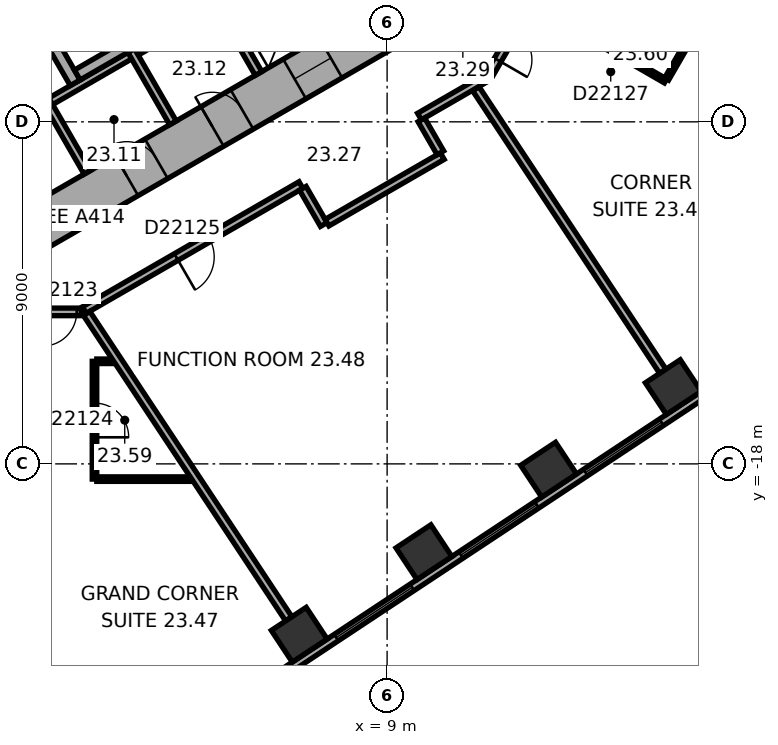
"""IFC4 building model, lengths in metres.
Left out: names, types, materials, properties, quantities, classifications, styles, units other than length and angle.
Written with IfcOpenShell. Run it as: python <this file> out.ifc"""

import sys

from ifc_helpers import new_model, si_unit, direction, frame, frame_2d, origin, origin_2d, place, context, subcontext, project, spatial, rectangle, extrude, element, fill, save


model = new_model("IFC4")
c1 = context("Model", 3, precision=1e-05, world=origin(), true_north=direction((0.0, 1.0)))
c2 = subcontext(c1, "Body", "Model", "MODEL_VIEW")
j1 = project(units=[si_unit("LENGTHUNIT", "METRE"), si_unit("PLANEANGLEUNIT", "RADIAN")], contexts=[c1])
p1 = place(None, origin())
s1 = spatial("IfcSite", under=j1, at=p1, CompositionType="ELEMENT")
p2 = place(p1, origin())
s2 = spatial("IfcBuilding", under=s1, at=p2, CompositionType="ELEMENT")
p3 = place(p2, frame((0.0, 0.0, 100.1)))
s3 = spatial("IfcBuildingStorey", under=s2, at=p3, CompositionType="ELEMENT", Elevation=100.1)
for number, where, z_axis, x_axis in (
    (1, (6.688, -22.496, 0.0), (0.0, 0.0, 1.0), (0.834, 0.552, 0.0)),
    (2, (9.969, -20.324, 0.0), (0.0, 0.0, 1.0), (0.834, 0.552, 0.0)),
    (3, (13.25, -18.152, 0.0), (0.0, 0.0, 1.0), (0.834, 0.552, 0.0)),
    (4, (16.531, -15.981, 0.0), (0.0, 0.0, 1.0), (0.834, 0.552, 0.0)),
):
    element("IfcColumn", number, at=place(p3, frame(where, z_axis=z_axis, x_axis=x_axis)), inside=s3, PredefinedType="COLUMN", context=c2, shape_type="SweptSolid", body=[
        extrude(rectangle(XDim=1.1, YDim=1.0, at=origin_2d()), origin(), (0.0, 0.0, 1.0), 3.3),
    ])
p4 = place(p3, frame((-10.4, -5.658, 0.0), z_axis=(0.0, 0.0, 1.0), x_axis=(0.866021384402, -0.500006961711, 0.0)))
e5 = element("IfcWall", 5, at=p4, inside=s3, PredefinedType="SHEAR", context=c2, shape_type="SweptSolid", body=[
    extrude(rectangle(XDim=12.355, YDim=1.2, at=frame_2d((6.178, 0.0))), origin(), (0.0, 0.0, 1.0), 3.3),
])
p5 = place(p4, frame((6.378, 0.0, 0.0)))
e6 = element("IfcOpeningElement", 6, at=p5, cuts=e5, PredefinedType="OPENING", context=c2, shape_type="SweptSolid", body=[
    extrude(rectangle(XDim=1.5, YDim=2.1, at=frame_2d((0.75, 1.05))), frame((0.0, 0.61, 0.0), z_axis=(0.0, -1.0, 0.0), x_axis=(1.0, 0.0, 0.0)), (0.0, 0.0, 1.0), 1.22),
])
p6 = place(p4, frame((3.228, 0.0, 0.0)))
e7 = element("IfcOpeningElement", 7, at=p6, cuts=e5, PredefinedType="OPENING", context=c2, shape_type="SweptSolid", body=[
    extrude(rectangle(XDim=0.9, YDim=2.1, at=frame_2d((0.45, 1.05))), frame((0.0, 0.61, 0.0), z_axis=(0.0, -1.0, 0.0), x_axis=(1.0, 0.0, 0.0)), (0.0, 0.0, 1.0), 1.22),
])
p7 = place(p3, frame((-0.3, -11.836, 0.0), z_axis=(0.0, 0.0, 1.0), x_axis=(0.866021384402, 0.500006961711, 0.0)))
e8 = element("IfcWall", 8, at=p7, inside=s3, PredefinedType="SHEAR", context=c2, shape_type="SweptSolid", body=[
    extrude(rectangle(XDim=12.355, YDim=1.2, at=frame_2d((6.178, 0.0))), origin(), (0.0, 0.0, 1.0), 3.3),
])
p8 = place(p7, frame((2.828, 0.0, 0.0)))
e9 = element("IfcOpeningElement", 9, at=p8, cuts=e8, PredefinedType="OPENING", context=c2, shape_type="SweptSolid", body=[
    extrude(rectangle(XDim=0.9, YDim=2.1, at=frame_2d((0.45, 1.05))), frame((0.0, 0.61, 0.0), z_axis=(0.0, -1.0, 0.0), x_axis=(1.0, 0.0, 0.0)), (0.0, 0.0, 1.0), 1.22),
])
p9 = place(p7, frame((5.428, 0.0, 0.0)))
e10 = element("IfcOpeningElement", 10, at=p9, cuts=e8, PredefinedType="OPENING", context=c2, shape_type="SweptSolid", body=[
    extrude(rectangle(XDim=0.9, YDim=2.1, at=frame_2d((0.45, 1.05))), frame((0.0, 0.61, 0.0), z_axis=(0.0, -1.0, 0.0), x_axis=(1.0, 0.0, 0.0)), (0.0, 0.0, 1.0), 1.22),
])
p10 = place(p7, frame((7.928, 0.0, 0.0)))
e11 = element("IfcOpeningElement", 11, at=p10, cuts=e8, PredefinedType="OPENING", context=c2, shape_type="SweptSolid", body=[
    extrude(rectangle(XDim=1.1, YDim=2.1, at=frame_2d((0.55, 1.05))), frame((0.0, 0.61, 0.0), z_axis=(0.0, -1.0, 0.0), x_axis=(1.0, 0.0, 0.0)), (0.0, 0.0, 1.0), 1.22),
])
p11 = place(p3, frame((3.083, -25.601, 0.0), z_axis=(0.0, 0.0, 1.0), x_axis=(0.833884295743, 0.551939291329, 0.0)))
e12 = element("IfcWall", 12, at=p11, inside=s3, PredefinedType="STANDARD", context=c2, shape_type="SweptSolid", body=[
    extrude(rectangle(XDim=21.246, YDim=0.2, at=frame_2d((10.623, 0.0))), origin(), (0.0, 0.0, 1.0), 3.3),
])
p12 = place(p11, frame((1.553, 0.0, 0.8)))
e13 = element("IfcOpeningElement", 13, at=p12, cuts=e12, PredefinedType="OPENING", context=c2, shape_type="SweptSolid", body=[
    extrude(rectangle(XDim=2.4, YDim=1.7, at=frame_2d((1.2, 0.85))), frame((0.0, 0.11, 0.0), z_axis=(0.0, -1.0, 0.0), x_axis=(1.0, 0.0, 0.0)), (0.0, 0.0, 1.0), 0.22),
])
p13 = place(p11, frame((5.488, 0.0, 0.8)))
e14 = element("IfcOpeningElement", 14, at=p13, cuts=e12, PredefinedType="OPENING", context=c2, shape_type="SweptSolid", body=[
    extrude(rectangle(XDim=2.4, YDim=1.7, at=frame_2d((1.2, 0.85))), frame((0.0, 0.11, 0.0), z_axis=(0.0, -1.0, 0.0), x_axis=(1.0, 0.0, 0.0)), (0.0, 0.0, 1.0), 0.22),
])
p14 = place(p11, frame((9.422, 0.0, 0.8)))
e15 = element("IfcOpeningElement", 15, at=p14, cuts=e12, PredefinedType="OPENING", context=c2, shape_type="SweptSolid", body=[
    extrude(rectangle(XDim=2.4, YDim=1.7, at=frame_2d((1.2, 0.85))), frame((0.0, 0.11, 0.0), z_axis=(0.0, -1.0, 0.0), x_axis=(1.0, 0.0, 0.0)), (0.0, 0.0, 1.0), 0.22),
])
p15 = place(p11, frame((13.357, 0.0, 0.8)))
e16 = element("IfcOpeningElement", 16, at=p15, cuts=e12, PredefinedType="OPENING", context=c2, shape_type="SweptSolid", body=[
    extrude(rectangle(XDim=2.4, YDim=1.7, at=frame_2d((1.2, 0.85))), frame((0.0, 0.11, 0.0), z_axis=(0.0, -1.0, 0.0), x_axis=(1.0, 0.0, 0.0)), (0.0, 0.0, 1.0), 0.22),
])
p16 = place(p11, frame((17.291, 0.0, 0.8)))
e17 = element("IfcOpeningElement", 17, at=p16, cuts=e12, PredefinedType="OPENING", context=c2, shape_type="SweptSolid", body=[
    extrude(rectangle(XDim=2.4, YDim=1.7, at=frame_2d((1.2, 0.85))), frame((0.0, 0.11, 0.0), z_axis=(0.0, -1.0, 0.0), x_axis=(1.0, 0.0, 0.0)), (0.0, 0.0, 1.0), 0.22),
])
p17 = place(p3, frame((-0.024, -8.559, 0.0), z_axis=(0.0, 0.0, 1.0), x_axis=(0.866026010844, 0.49999894854, 0.0)))
e18 = element("IfcWall", 18, at=p17, inside=s3, PredefinedType="PARTITIONING", context=c2, shape_type="SweptSolid", body=[
    extrude(rectangle(XDim=8.0, YDim=0.2, at=frame_2d((4.0, 0.0))), origin(), (0.0, 0.0, 1.0), 3.05),
])
for number, where, z_axis, x_axis in (
    (19, (0.013, -8.422, 0.0), (0.0, 0.0, 1.0), (0.5, -0.866, 0.0)),
    (20, (2.264, -7.122, 0.0), (0.0, 0.0, 1.0), (0.5, -0.866, 0.0)),
    (21, (4.516, -5.822, 0.0), (0.0, 0.0, 1.0), (0.5, -0.866, 0.0)),
):
    element("IfcWall", number, at=place(p3, frame(where, z_axis=z_axis, x_axis=x_axis)), inside=s3, PredefinedType="PARTITIONING", context=c2, shape_type="SweptSolid", body=[
        extrude(rectangle(XDim=2.2, YDim=0.2, at=frame_2d((1.1, 0.0))), origin(), (0.0, 0.0, 1.0), 3.05),
    ])
p18 = place(p3, frame((-1.558, -3.902, 0.0), z_axis=(0.0, 0.0, 1.0), x_axis=(0.499977259774, -0.866038532462, 0.0)))
e22 = element("IfcWall", 22, at=p18, inside=s3, PredefinedType="SHEAR", context=c2, shape_type="SweptSolid", body=[
    extrude(rectangle(XDim=4.7, YDim=0.3, at=frame_2d((2.35, 0.0))), origin(), (0.0, 0.0, 1.0), 3.05),
])
p19 = place(p18, frame((0.8, 0.0, 0.0)))
e23 = element("IfcOpeningElement", 23, at=p19, cuts=e22, PredefinedType="OPENING", context=c2, shape_type="SweptSolid", body=[
    extrude(rectangle(XDim=1.2, YDim=2.1, at=frame_2d((0.6, 1.05))), frame((0.0, 0.16, 0.0), z_axis=(0.0, -1.0, 0.0), x_axis=(1.0, 0.0, 0.0)), (0.0, 0.0, 1.0), 0.32),
])
p20 = place(p3, frame((0.847, -7.767, 0.0), z_axis=(0.0, 0.0, 1.0), x_axis=(0.866027801685, 0.499995846692, 0.0)))
e24 = element("IfcWall", 24, at=p20, inside=s3, PredefinedType="SHEAR", context=c2, shape_type="SweptSolid", body=[
    extrude(rectangle(XDim=7.06, YDim=0.3, at=frame_2d((3.53, 0.0))), origin(), (0.0, 0.0, 1.0), 3.05),
])
p21 = place(p3, frame((-0.91, -14.001, 0.0), z_axis=(0.0, 0.0, 1.0), x_axis=(1.0, 0.0, 0.0)))
e25 = element("IfcWall", 25, at=p21, inside=s3, PredefinedType="PARTITIONING", context=c2, shape_type="SweptSolid", body=[
    extrude(rectangle(XDim=1.86, YDim=0.2, at=frame_2d((0.93, 0.0))), origin(), (0.0, 0.0, 1.0), 3.05),
])
p22 = place(p21, frame((0.842, 0.0, 0.0)))
e26 = element("IfcOpeningElement", 26, at=p22, cuts=e25, PredefinedType="OPENING", context=c2, shape_type="SweptSolid", body=[
    extrude(rectangle(XDim=0.9, YDim=2.1, at=frame_2d((0.45, 1.05))), frame((0.0, 0.11, 0.0), z_axis=(0.0, -1.0, 0.0), x_axis=(1.0, 0.0, 0.0)), (0.0, 0.0, 1.0), 0.22),
])
p23 = place(p3, frame((1.033, -13.953, 0.0), z_axis=(0.0, 0.0, 1.0), x_axis=(0.866017531406, 0.500013635111, 0.0)))
e27 = element("IfcWall", 27, at=p23, inside=s3, PredefinedType="PARTITIONING", context=c2, shape_type="SweptSolid", body=[
    extrude(rectangle(XDim=6.58, YDim=0.2, at=frame_2d((3.29, 0.0))), origin(), (0.0, 0.0, 1.0), 3.05),
])
p24 = place(p23, frame((2.79, 0.0, 0.0)))
e28 = element("IfcOpeningElement", 28, at=p24, cuts=e27, PredefinedType="OPENING", context=c2, shape_type="SweptSolid", body=[
    extrude(rectangle(XDim=1.0, YDim=2.1, at=frame_2d((0.5, 1.05))), frame((0.0, 0.11, 0.0), z_axis=(0.0, -1.0, 0.0), x_axis=(1.0, 0.0, 0.0)), (0.0, 0.0, 1.0), 0.22),
])
p25 = place(p3, frame((1.3, -18.401, 0.0), z_axis=(0.0, 0.0, 1.0), x_axis=(0.0, 1.0, 0.0)))
e29 = element("IfcWall", 29, at=p25, inside=s3, PredefinedType="PARTITIONING", context=c2, shape_type="SweptSolid", body=[
    extrude(rectangle(XDim=3.1, YDim=0.12, at=frame_2d((1.55, 0.0))), origin(), (0.0, 0.0, 1.0), 3.05),
])
p26 = place(p25, frame((1.1, 0.0, 0.0)))
e30 = element("IfcOpeningElement", 30, at=p26, cuts=e29, PredefinedType="OPENING", context=c2, shape_type="SweptSolid", body=[
    extrude(rectangle(XDim=0.9, YDim=2.1, at=frame_2d((0.45, 1.05))), frame((0.0, 0.07, 0.0), z_axis=(0.0, -1.0, 0.0), x_axis=(1.0, 0.0, 0.0)), (0.0, 0.0, 1.0), 0.14),
])
p27 = place(p3, frame((1.36, -15.301, 0.0), z_axis=(0.0, 0.0, 1.0), x_axis=(1.0, 0.0, 0.0)))
e31 = element("IfcWall", 31, at=p27, inside=s3, PredefinedType="PARTITIONING", context=c2, shape_type="SweptSolid", body=[
    extrude(rectangle(XDim=0.416, YDim=0.12, at=frame_2d((0.208, 0.0))), origin(), (0.0, 0.0, 1.0), 3.05),
])
p28 = place(p3, frame((3.828, -18.401, 0.0), z_axis=(0.0, 0.0, 1.0), x_axis=(-1.0, 0.0, 0.0)))
e32 = element("IfcWall", 32, at=p28, inside=s3, PredefinedType="PARTITIONING", context=c2, shape_type="SweptSolid", body=[
    extrude(rectangle(XDim=2.468, YDim=0.12, at=frame_2d((1.234, 0.0))), origin(), (0.0, 0.0, 1.0), 3.05),
])
p29 = place(p3, frame((6.412, -22.079, 0.0), z_axis=(0.0, 0.0, 1.0), x_axis=(-0.551919507115, 0.83389739037, 0.0)))
e33 = element("IfcWall", 33, at=p29, inside=s3, PredefinedType="PARTITIONING", context=c2, shape_type="SweptSolid", body=[
    extrude(rectangle(XDim=9.635, YDim=0.2, at=frame_2d((4.817, 0.0))), origin(), (0.0, 0.0, 1.0), 3.05),
])
p30 = place(p3, frame((6.782, -10.749, 0.0), z_axis=(0.0, 0.0, 1.0), x_axis=(0.500074377092, -0.865982457891, 0.0)))
e34 = element("IfcWall", 34, at=p30, inside=s3, PredefinedType="PARTITIONING", context=c2, shape_type="SweptSolid", body=[
    extrude(rectangle(XDim=1.101, YDim=0.2, at=frame_2d((0.55, 0.0))), origin(), (0.0, 0.0, 1.0), 3.05),
])
p31 = place(p3, frame((7.419, -11.653, 0.0), z_axis=(0.0, 0.0, 1.0), x_axis=(0.866038154057, 0.49997791523, 0.0)))
e35 = element("IfcWall", 35, at=p31, inside=s3, PredefinedType="PARTITIONING", context=c2, shape_type="SweptSolid", body=[
    extrude(rectangle(XDim=3.502, YDim=0.2, at=frame_2d((1.751, 0.0))), origin(), (0.0, 0.0, 1.0), 3.05),
])
p32 = place(p3, frame((9.852, -8.861, 0.0), z_axis=(0.0, 0.0, 1.0), x_axis=(0.866013291437, 0.500020978615, 0.0)))
e36 = element("IfcWall", 36, at=p32, inside=s3, PredefinedType="PARTITIONING", context=c2, shape_type="SweptSolid", body=[
    extrude(rectangle(XDim=2.077, YDim=0.2, at=frame_2d((1.038, 0.0))), origin(), (0.0, 0.0, 1.0), 3.05),
])
p33 = place(p3, frame((10.402, -9.815, 0.0), z_axis=(0.0, 0.0, 1.0), x_axis=(-0.499968756647, 0.866043441391, 0.0)))
e37 = element("IfcWall", 37, at=p33, inside=s3, PredefinedType="PARTITIONING", context=c2, shape_type="SweptSolid", body=[
    extrude(rectangle(XDim=1.001, YDim=0.2, at=frame_2d((0.5, 0.0))), origin(), (0.0, 0.0, 1.0), 3.05),
])
p34 = place(p3, frame((11.67, -7.788, 0.0), z_axis=(0.0, 0.0, 1.0), x_axis=(0.500063286585, 0.865988862174, 0.0)))
e38 = element("IfcWall", 38, at=p34, inside=s3, PredefinedType="PARTITIONING", context=c2, shape_type="SweptSolid", body=[
    extrude(rectangle(XDim=1.86, YDim=0.2, at=frame_2d((0.93, 0.0))), origin(), (0.0, 0.0, 1.0), 3.05),
])
p35 = place(p34, frame((0.48, 0.0, 0.0)))
e39 = element("IfcOpeningElement", 39, at=p35, cuts=e38, PredefinedType="OPENING", context=c2, shape_type="SweptSolid", body=[
    extrude(rectangle(XDim=0.9, YDim=2.1, at=frame_2d((0.45, 1.05))), frame((0.0, 0.11, 0.0), z_axis=(0.0, -1.0, 0.0), x_axis=(1.0, 0.0, 0.0)), (0.0, 0.0, 1.0), 0.22),
])
p36 = place(p3, frame((16.255, -15.564, 0.0), z_axis=(0.0, 0.0, 1.0), x_axis=(-0.55192208744, 0.833895682562, 0.0)))
e40 = element("IfcWall", 40, at=p36, inside=s3, PredefinedType="PARTITIONING", context=c2, shape_type="SweptSolid", body=[
    extrude(rectangle(XDim=8.913, YDim=0.2, at=frame_2d((4.457, 0.0))), origin(), (0.0, 0.0, 1.0), 2.6),
])
p37 = place(p3, frame((16.326, -7.925, 0.0), z_axis=(0.0, 0.0, 1.0), x_axis=(-0.865997131366, 0.500048966069, 0.0)))
e41 = element("IfcWall", 41, at=p37, inside=s3, PredefinedType="PARTITIONING", context=c2, shape_type="SweptSolid", body=[
    extrude(rectangle(XDim=2.74, YDim=0.12, at=frame_2d((1.37, 0.0))), origin(), (0.0, 0.0, 1.0), 3.05),
])
p38 = place(p37, frame((0.92, 0.0, 0.0)))
e42 = element("IfcOpeningElement", 42, at=p38, cuts=e41, PredefinedType="OPENING", context=c2, shape_type="SweptSolid", body=[
    extrude(rectangle(XDim=0.9, YDim=2.1, at=frame_2d((0.45, 1.05))), frame((0.0, 0.07, 0.0), z_axis=(0.0, -1.0, 0.0), x_axis=(1.0, 0.0, 0.0)), (0.0, 0.0, 1.0), 0.14),
])
p39 = place(p3, frame((17.396, -6.071, 0.0), z_axis=(0.0, 0.0, 1.0), x_axis=(-0.500027264788, -0.866009661879, 0.0)))
e43 = element("IfcWall", 43, at=p39, inside=s3, PredefinedType="PARTITIONING", context=c2, shape_type="SweptSolid", body=[
    extrude(rectangle(XDim=2.08, YDim=0.12, at=frame_2d((1.04, 0.0))), origin(), (0.0, 0.0, 1.0), 3.05),
])
p40 = place(p13, origin())
e44 = element("IfcWindow", 44, at=p40, inside=s3, PartitioningType="SINGLE_PANEL", PredefinedType="WINDOW", context=c2, shape_type="SweptSolid", body=[
    extrude(rectangle(XDim=2.4, YDim=1.7, at=frame_2d((1.2, 0.85))), frame((0.0, 0.03, 0.0), z_axis=(0.0, -1.0, 0.0), x_axis=(1.0, 0.0, 0.0)), (0.0, 0.0, 1.0), 0.06),
])
fill(e14, e44)
p41 = place(p14, origin())
e45 = element("IfcWindow", 45, at=p41, inside=s3, PartitioningType="SINGLE_PANEL", PredefinedType="WINDOW", context=c2, shape_type="SweptSolid", body=[
    extrude(rectangle(XDim=2.4, YDim=1.7, at=frame_2d((1.2, 0.85))), frame((0.0, 0.03, 0.0), z_axis=(0.0, -1.0, 0.0), x_axis=(1.0, 0.0, 0.0)), (0.0, 0.0, 1.0), 0.06),
])
fill(e15, e45)
p42 = place(p15, origin())
e46 = element("IfcWindow", 46, at=p42, inside=s3, PartitioningType="SINGLE_PANEL", PredefinedType="WINDOW", context=c2, shape_type="SweptSolid", body=[
    extrude(rectangle(XDim=2.4, YDim=1.7, at=frame_2d((1.2, 0.85))), frame((0.0, 0.03, 0.0), z_axis=(0.0, -1.0, 0.0), x_axis=(1.0, 0.0, 0.0)), (0.0, 0.0, 1.0), 0.06),
])
fill(e16, e46)
p43 = place(p8, origin())
e47 = element("IfcDoor", 47, at=p43, inside=s3, OperationType="SINGLE_SWING_LEFT", PredefinedType="DOOR", context=c2, shape_type="SweptSolid", body=[
    extrude(rectangle(XDim=0.9, YDim=2.1, at=frame_2d((0.45, 1.05))), frame((0.0, 0.025, 0.0), z_axis=(0.0, -1.0, 0.0), x_axis=(1.0, 0.0, 0.0)), (0.0, 0.0, 1.0), 0.05),
])
fill(e9, e47)
p44 = place(p9, origin())
e48 = element("IfcDoor", 48, at=p44, inside=s3, OperationType="SINGLE_SWING_LEFT", PredefinedType="DOOR", context=c2, shape_type="SweptSolid", body=[
    extrude(rectangle(XDim=0.9, YDim=2.1, at=frame_2d((0.45, 1.05))), frame((0.0, 0.025, 0.0), z_axis=(0.0, -1.0, 0.0), x_axis=(1.0, 0.0, 0.0)), (0.0, 0.0, 1.0), 0.05),
])
fill(e10, e48)
p45 = place(p10, origin())
e49 = element("IfcDoor", 49, at=p45, inside=s3, OperationType="DOUBLE_DOOR_SLIDING", PredefinedType="DOOR", context=c2, shape_type="SweptSolid", body=[
    extrude(rectangle(XDim=1.1, YDim=2.1, at=frame_2d((0.55, 1.05))), frame((0.0, 0.025, 0.0), z_axis=(0.0, -1.0, 0.0), x_axis=(1.0, 0.0, 0.0)), (0.0, 0.0, 1.0), 0.05),
])
fill(e11, e49)
p46 = place(p22, origin())
e50 = element("IfcDoor", 50, at=p46, inside=s3, OperationType="SINGLE_SWING_LEFT", PredefinedType="DOOR", context=c2, shape_type="SweptSolid", body=[
    extrude(rectangle(XDim=0.9, YDim=2.1, at=frame_2d((0.45, 1.05))), frame((0.0, 0.025, 0.0), z_axis=(0.0, -1.0, 0.0), x_axis=(1.0, 0.0, 0.0)), (0.0, 0.0, 1.0), 0.05),
])
fill(e26, e50)
p47 = place(p26, origin())
e51 = element("IfcDoor", 51, at=p47, inside=s3, OperationType="SINGLE_SWING_LEFT", PredefinedType="DOOR", context=c2, shape_type="SweptSolid", body=[
    extrude(rectangle(XDim=0.9, YDim=2.1, at=frame_2d((0.45, 1.05))), frame((0.0, 0.025, 0.0), z_axis=(0.0, -1.0, 0.0), x_axis=(1.0, 0.0, 0.0)), (0.0, 0.0, 1.0), 0.05),
])
fill(e30, e51)
p48 = place(p24, origin())
e52 = element("IfcDoor", 52, at=p48, inside=s3, OperationType="SINGLE_SWING_LEFT", PredefinedType="DOOR", context=c2, shape_type="SweptSolid", body=[
    extrude(rectangle(XDim=1.0, YDim=2.1, at=frame_2d((0.5, 1.05))), frame((0.0, 0.025, 0.0), z_axis=(0.0, -1.0, 0.0), x_axis=(1.0, 0.0, 0.0)), (0.0, 0.0, 1.0), 0.05),
])
fill(e28, e52)
p49 = place(p35, origin())
e53 = element("IfcDoor", 53, at=p49, inside=s3, OperationType="SINGLE_SWING_LEFT", PredefinedType="DOOR", context=c2, shape_type="SweptSolid", body=[
    extrude(rectangle(XDim=0.9, YDim=2.1, at=frame_2d((0.45, 1.05))), frame((0.0, 0.025, 0.0), z_axis=(0.0, -1.0, 0.0), x_axis=(1.0, 0.0, 0.0)), (0.0, 0.0, 1.0), 0.05),
])
fill(e39, e53)
p50 = place(p38, origin())
e54 = element("IfcDoor", 54, at=p50, inside=s3, OperationType="SINGLE_SWING_LEFT", PredefinedType="DOOR", context=c2, shape_type="SweptSolid", body=[
    extrude(rectangle(XDim=0.9, YDim=2.1, at=frame_2d((0.45, 1.05))), frame((0.0, 0.025, 0.0), z_axis=(0.0, -1.0, 0.0), x_axis=(1.0, 0.0, 0.0)), (0.0, 0.0, 1.0), 0.05),
])
fill(e42, e54)
save(model, sys.argv[1])
